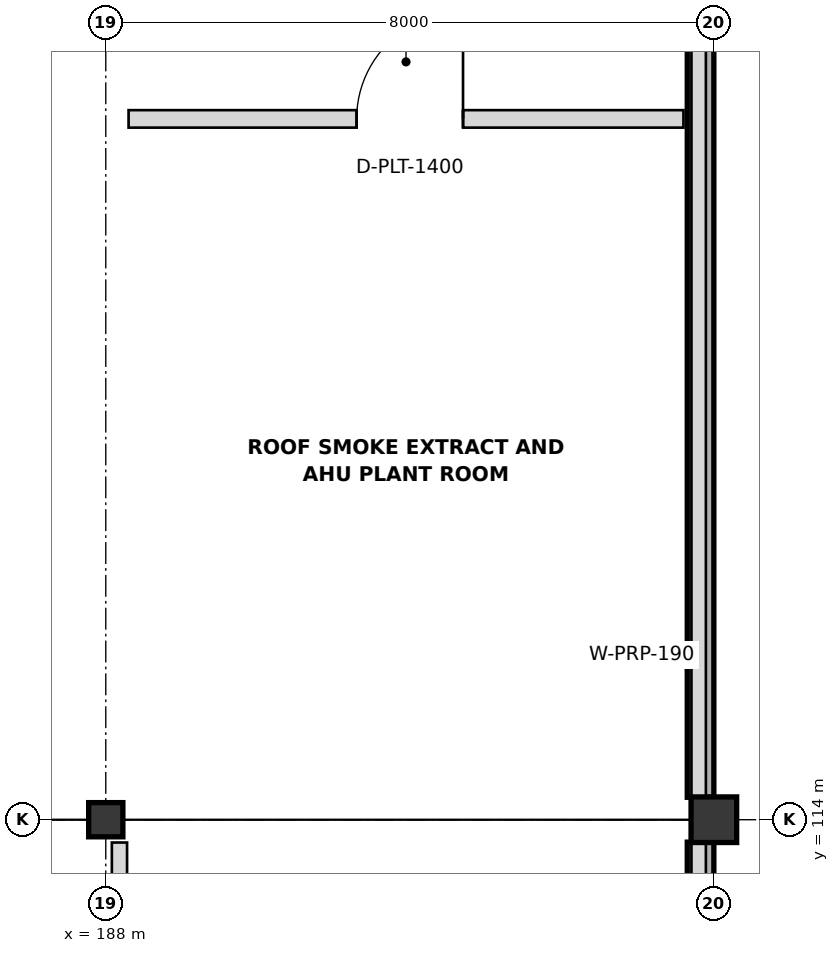
"""IFC4 building model, lengths in metres.
Left out: names, types, materials, properties, quantities, classifications, styles, units other than length and angle.
Written with IfcOpenShell. Run it as: python <this file> out.ifc"""

import sys

from ifc_helpers import new_model, si_unit, direction, frame, frame_2d, origin, origin_2d, place, context, subcontext, project, spatial, rectangle, extrude, element, fill, save


model = new_model("IFC4")
c1 = context("Model", 3, precision=1e-05, world=origin(), true_north=direction((0.0, 1.0)))
c2 = subcontext(c1, "Body", "Model", "MODEL_VIEW")
j1 = project(units=[si_unit("LENGTHUNIT", "METRE"), si_unit("PLANEANGLEUNIT", "RADIAN")], contexts=[c1])
p1 = place(None, origin())
s1 = spatial("IfcSite", under=j1, at=p1, CompositionType="ELEMENT")
p2 = place(p1, origin())
s2 = spatial("IfcBuilding", under=s1, at=p2, CompositionType="ELEMENT")
p3 = place(p2, frame((0.0, 0.0, 27.0)))
s3 = spatial("IfcBuildingStorey", under=s2, at=p3, CompositionType="ELEMENT", Elevation=27.0)
p4 = place(p3, frame((188.0, 114.0, 0.0), z_axis=(0.0, 0.0, 1.0), x_axis=(1.0, 0.0, 0.0)))
e1 = element("IfcColumn", 1, at=p4, inside=s3, PredefinedType="COLUMN", context=c2, shape_type="SweptSolid", body=[
    extrude(rectangle(XDim=0.45, YDim=0.45, at=origin_2d()), origin(), (0.0, 0.0, 1.0), 4.2),
])
p5 = place(p3, frame((196.0, 114.0, 0.0), z_axis=(0.0, 0.0, 1.0), x_axis=(1.0, 0.0, 0.0)))
e2 = element("IfcColumn", 2, at=p5, inside=s3, PredefinedType="COLUMN", context=c2, shape_type="SweptSolid", body=[
    extrude(rectangle(XDim=0.6, YDim=0.6, at=origin_2d()), origin(), (0.0, 0.0, 1.0), 4.2),
])
for number, where, z_axis, x_axis in (
    (3, (195.825, 113.705, 0.0), (0.0, 0.0, 1.0), (0.0, -1.0, 0.0)),
    (4, (195.825, 125.705, 0.0), (0.0, 0.0, 1.0), (0.0, -1.0, 0.0)),
):
    element("IfcWall", number, at=place(p3, frame(where, z_axis=z_axis, x_axis=x_axis)), inside=s3, PredefinedType="SOLIDWALL", context=c2, shape_type="SweptSolid", body=[
        extrude(rectangle(XDim=11.41, YDim=0.35, at=frame_2d((5.705, 0.0))), origin(), (0.0, 0.0, 1.0), 4.2),
    ])
p6 = place(p3, frame((195.8, 90.12, 4.2), z_axis=(0.0, 0.0, 1.0), x_axis=(0.0, 1.0, 0.0)))
e5 = element("IfcWall", 5, at=p6, inside=s3, PredefinedType="PARAPET", context=c2, shape_type="SweptSolid", body=[
    extrude(rectangle(XDim=45.68, YDim=0.19, at=frame_2d((22.84, 0.0))), origin(), (0.0, 0.0, 1.0), 0.95),
])
p7 = place(p3, frame((188.3, 123.22, 0.0), z_axis=(0.0, 0.0, 1.0), x_axis=(1.0, 0.0, 0.0)))
e6 = element("IfcWall", 6, at=p7, inside=s3, PredefinedType="PARTITIONING", context=c2, shape_type="SweptSolid", body=[
    extrude(rectangle(XDim=7.3, YDim=0.23, at=frame_2d((3.65, 0.0))), origin(), (0.0, 0.0, 1.0), 3.218),
])
p8 = place(p7, frame((3.0, 0.0, 0.0)))
e7 = element("IfcOpeningElement", 7, at=p8, cuts=e6, PredefinedType="OPENING", context=c2, shape_type="SweptSolid", body=[
    extrude(rectangle(XDim=1.4, YDim=2.2, at=frame_2d((0.7, 1.1))), frame((0.0, 0.125, 0.0), z_axis=(0.0, -1.0, 0.0), x_axis=(1.0, 0.0, 0.0)), (0.0, 0.0, 1.0), 0.25),
])
p9 = place(p3, frame((188.18, 90.4, 0.0), z_axis=(0.0, 0.0, 1.0), x_axis=(0.0, 1.0, 0.0)))
e8 = element("IfcWall", 8, at=p9, inside=s3, PredefinedType="PARTITIONING", context=c2, shape_type="SweptSolid", body=[
    extrude(rectangle(XDim=23.3, YDim=0.2, at=frame_2d((11.65, 0.0))), origin(), (0.0, 0.0, 1.0), 3.218),
])
p10 = place(p9, frame((5.1, 0.0, 0.0)))
e9 = element("IfcOpeningElement", 9, at=p10, cuts=e8, PredefinedType="OPENING", context=c2, shape_type="SweptSolid", body=[
    extrude(rectangle(XDim=1.0, YDim=2.2, at=frame_2d((0.5, 1.1))), frame((0.0, 0.11, 0.0), z_axis=(0.0, -1.0, 0.0), x_axis=(1.0, 0.0, 0.0)), (0.0, 0.0, 1.0), 0.22),
])
p11 = place(p8, origin())
e10 = element("IfcDoor", 10, at=p11, inside=s3, OperationType="SINGLE_SWING_RIGHT", PredefinedType="DOOR", context=c2, shape_type="SweptSolid", body=[
    extrude(rectangle(XDim=1.4, YDim=2.2, at=frame_2d((0.7, 1.1))), frame((0.0, 0.025, 0.0), z_axis=(0.0, -1.0, 0.0), x_axis=(1.0, 0.0, 0.0)), (0.0, 0.0, 1.0), 0.05),
])
fill(e7, e10)
save(model, sys.argv[1])
